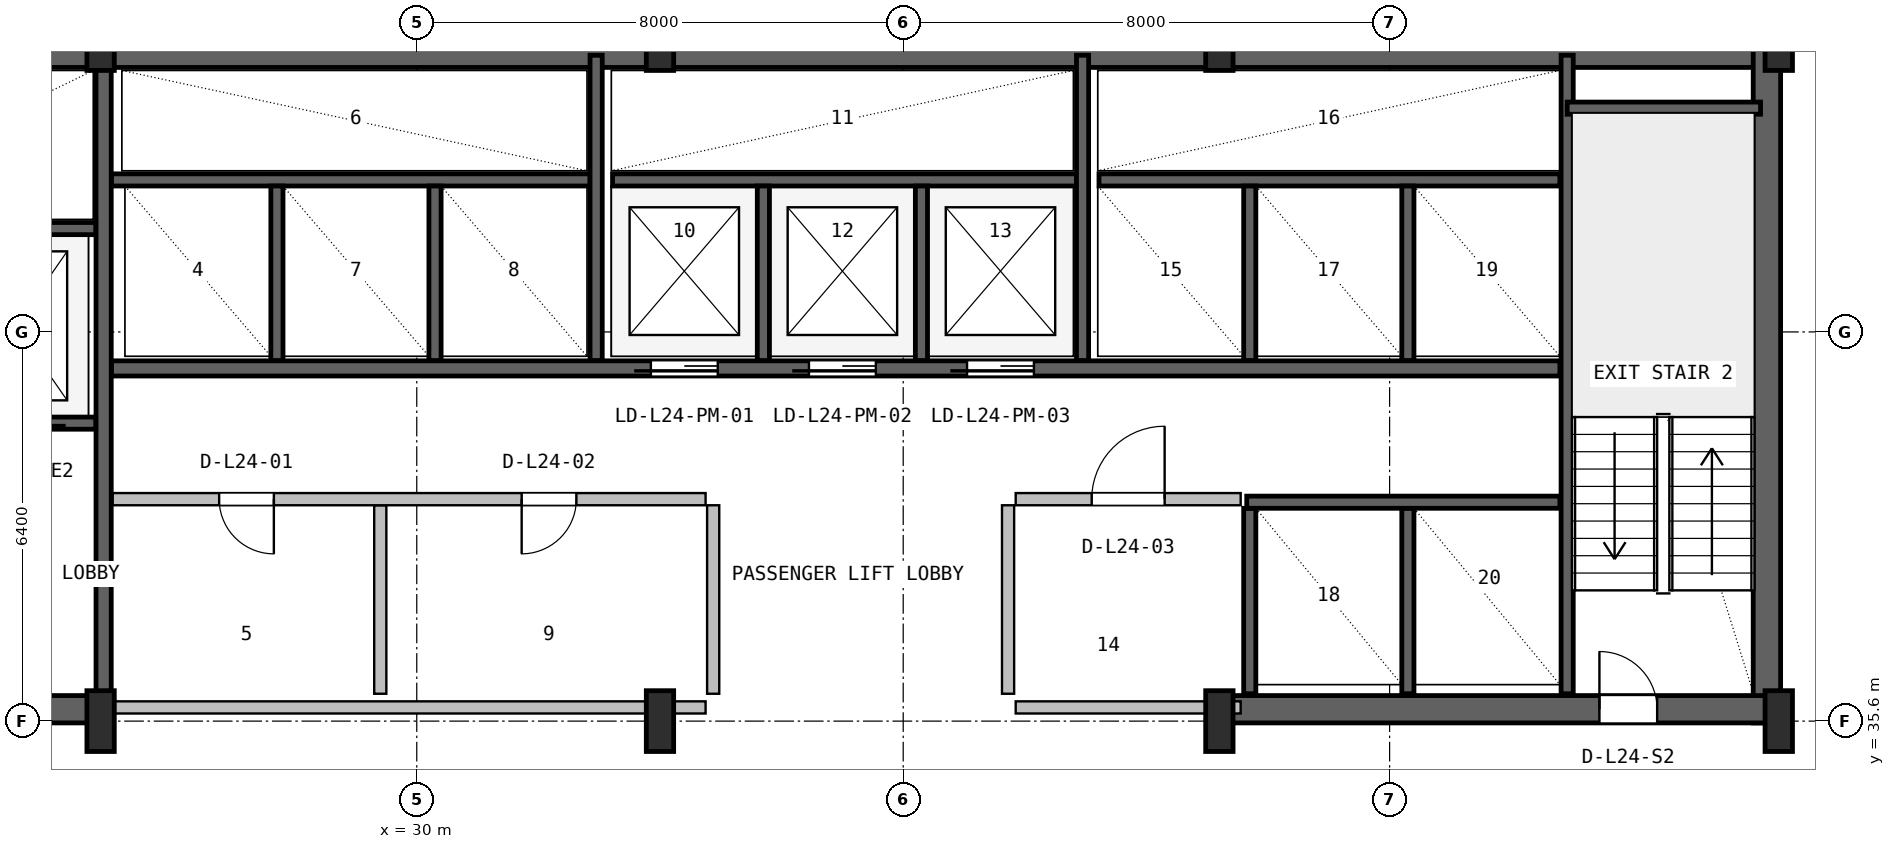
"""IFC4 building model, lengths in metres.
Left out: names, types, materials, properties, quantities, classifications, styles, units other than length and angle.
Written with IfcOpenShell. Run it as: python <this file> out.ifc"""

import sys

from ifc_helpers import new_model, si_unit, direction, frame, frame_2d, origin, origin_2d, place, context, subcontext, project, spatial, rectangle, i_section, extrude, source, transform, mapped, element, fill, save


model = new_model("IFC4")
c1 = context("Model", 3, precision=1e-05, world=origin(), true_north=direction((0.0, 1.0)))
c2 = subcontext(c1, "Body", "Model", "MODEL_VIEW")
j1 = project(units=[si_unit("LENGTHUNIT", "METRE"), si_unit("PLANEANGLEUNIT", "RADIAN")], contexts=[c1])
p1 = place(None, origin())
s1 = spatial("IfcSite", under=j1, at=p1, CompositionType="ELEMENT")
p2 = place(p1, origin())
s2 = spatial("IfcBuilding", under=s1, at=p2, CompositionType="ELEMENT")
p3 = place(p2, frame((0.0, 0.0, 103.0)))
s3 = spatial("IfcBuildingStorey", under=s2, at=p3, CompositionType="ELEMENT", Elevation=103.0)
p4 = place(p3, frame((15.6, 46.575, 0.0), z_axis=(0.0, 0.0, 1.0), x_axis=(1.0, 0.0, 0.0)))
e1 = element("IfcWall", 1, at=p4, inside=s3, PredefinedType="SHEAR", context=c2, shape_type="SweptSolid", body=[
    extrude(rectangle(XDim=36.8, YDim=0.45, at=frame_2d((18.4, 0.0))), origin(), (0.0, 0.0, 1.0), 3.55),
])
p5 = place(p3, frame((52.205, 35.57, 0.0), z_axis=(0.0, 0.0, 1.0), x_axis=(0.0, 1.0, 0.0)))
e2 = element("IfcWall", 2, at=p5, inside=s3, PredefinedType="SHEAR", context=c2, shape_type="SweptSolid", body=[
    extrude(rectangle(XDim=11.23, YDim=0.45, at=frame_2d((5.615, 0.0))), origin(), (0.0, 0.0, 1.0), 3.55),
])
p6 = place(p3, frame((15.57, 35.795, 0.0), z_axis=(0.0, 0.0, 1.0), x_axis=(1.0, 0.0, 0.0)))
e3 = element("IfcWall", 3, at=p6, inside=s3, PredefinedType="SHEAR", context=c2, shape_type="SweptSolid", body=[
    extrude(rectangle(XDim=9.23, YDim=0.45, at=frame_2d((4.615, 0.0))), origin(), (0.0, 0.0, 1.0), 3.55),
])
p7 = place(p6, frame((5.4, 0.0, 0.0)))
e4 = element("IfcOpeningElement", 4, at=p7, cuts=e3, PredefinedType="OPENING", context=c2, shape_type="SweptSolid", body=[
    extrude(rectangle(XDim=1.0, YDim=2.1, at=frame_2d((0.5, 1.05))), frame((0.0, 0.235, 0.0), z_axis=(0.0, -1.0, 0.0), x_axis=(1.0, 0.0, 0.0)), (0.0, 0.0, 1.0), 0.47),
])
p8 = place(p3, frame((43.2, 35.795, 0.0), z_axis=(0.0, 0.0, 1.0), x_axis=(1.0, 0.0, 0.0)))
e5 = element("IfcWall", 5, at=p8, inside=s3, PredefinedType="SHEAR", context=c2, shape_type="SweptSolid", body=[
    extrude(rectangle(XDim=9.23, YDim=0.45, at=frame_2d((4.615, 0.0))), origin(), (0.0, 0.0, 1.0), 3.55),
])
p9 = place(p8, frame((6.25, 0.0, 0.0)))
e6 = element("IfcOpeningElement", 6, at=p9, cuts=e5, PredefinedType="OPENING", context=c2, shape_type="SweptSolid", body=[
    extrude(rectangle(XDim=0.95, YDim=2.1, at=frame_2d((0.475, 1.05))), frame((0.0, 0.235, 0.0), z_axis=(0.0, -1.0, 0.0), x_axis=(1.0, 0.0, 0.0)), (0.0, 0.0, 1.0), 0.47),
])
m1 = source(origin(), c2, "Body", "SweptSolid", [
    extrude(i_section(OverallWidth=0.45, OverallDepth=1.0, WebThickness=0.016, FlangeThickness=0.03, FilletRadius=0.016, at=origin_2d()), origin(), (0.0, 0.0, 1.0), 3.8),
])
for number, where, z_axis, x_axis in (
    (7, (24.8, 35.6, 0.0), (0.0, 0.0, 1.0), (1.0, 0.0, 0.0)),
    (8, (24.8, 46.8, 0.0), (0.0, 0.0, 1.0), (1.0, 0.0, 0.0)),
    (9, (34.0, 35.6, 0.0), (0.0, 0.0, 1.0), (1.0, 0.0, 0.0)),
    (10, (34.0, 46.8, 0.0), (0.0, 0.0, 1.0), (1.0, 0.0, 0.0)),
    (11, (43.2, 35.6, 0.0), (0.0, 0.0, 1.0), (1.0, 0.0, 0.0)),
    (12, (43.2, 46.8, 0.0), (0.0, 0.0, 1.0), (1.0, 0.0, 0.0)),
    (13, (52.4, 35.6, 0.0), (0.0, 0.0, 1.0), (1.0, 0.0, 0.0)),
    (14, (52.4, 46.8, 0.0), (0.0, 0.0, 1.0), (1.0, 0.0, 0.0)),
):
    element("IfcColumn", number, at=place(p3, frame(where, z_axis=z_axis, x_axis=x_axis)), inside=s3, PredefinedType="COLUMN", context=c2, shape_type="MappedRepresentation", body=[
        mapped(m1, transform((0.0, 0.0, 0.0), x_axis=(1.0, 0.0, 0.0), y_axis=(0.0, 1.0, 0.0), z_axis=(0.0, 0.0, 1.0), scale=1.0)),
    ])
p10 = place(p3, frame((24.85, 36.05, 0.0), z_axis=(0.0, 0.0, 1.0), x_axis=(0.0, 1.0, 0.0)))
e15 = element("IfcWall", 15, at=p10, inside=s3, PredefinedType="SHEAR", context=c2, shape_type="SweptSolid", body=[
    extrude(rectangle(XDim=10.45, YDim=0.25, at=frame_2d((5.225, 0.0))), origin(), (0.0, 0.0, 1.0), 3.55),
])
p11 = place(p3, frame((19.2, 40.5, 0.0), z_axis=(0.0, 0.0, 1.0), x_axis=(1.0, 0.0, 0.0)))
e16 = element("IfcWall", 16, at=p11, inside=s3, PredefinedType="SHEAR", context=c2, shape_type="SweptSolid", body=[
    extrude(rectangle(XDim=5.52, YDim=0.2, at=frame_2d((2.76, 0.0))), origin(), (0.0, 0.0, 1.0), 3.55),
])
p12 = place(p11, frame((1.05, 0.0, 0.0)))
e17 = element("IfcOpeningElement", 17, at=p12, cuts=e16, PredefinedType="OPENING", context=c2, shape_type="SweptSolid", body=[
    extrude(rectangle(XDim=1.1, YDim=2.18, at=frame_2d((0.55, 1.09))), frame((0.0, 0.11, 0.0), z_axis=(0.0, -1.0, 0.0), x_axis=(1.0, 0.0, 0.0)), (0.0, 0.0, 1.0), 0.22),
])
p13 = place(p11, frame((3.65, 0.0, 0.0)))
e18 = element("IfcOpeningElement", 18, at=p13, cuts=e16, PredefinedType="OPENING", context=c2, shape_type="SweptSolid", body=[
    extrude(rectangle(XDim=1.1, YDim=2.18, at=frame_2d((0.55, 1.09))), frame((0.0, 0.11, 0.0), z_axis=(0.0, -1.0, 0.0), x_axis=(1.0, 0.0, 0.0)), (0.0, 0.0, 1.0), 0.22),
])
p14 = place(p3, frame((19.2, 43.7, 0.0), z_axis=(0.0, 0.0, 1.0), x_axis=(1.0, 0.0, 0.0)))
e19 = element("IfcWall", 19, at=p14, inside=s3, PredefinedType="SHEAR", context=c2, shape_type="SweptSolid", body=[
    extrude(rectangle(XDim=5.52, YDim=0.2, at=frame_2d((2.76, 0.0))), origin(), (0.0, 0.0, 1.0), 3.55),
])
p15 = place(p3, frame((48.92, 36.05, 0.0), z_axis=(0.0, 0.0, 1.0), x_axis=(0.0, 1.0, 0.0)))
e20 = element("IfcWall", 20, at=p15, inside=s3, PredefinedType="SHEAR", context=c2, shape_type="SweptSolid", body=[
    extrude(rectangle(XDim=10.5, YDim=0.2, at=frame_2d((5.25, 0.0))), origin(), (0.0, 0.0, 1.0), 3.55),
])
p16 = place(p3, frame((48.92, 45.68, 0.0), z_axis=(0.0, 0.0, 1.0), x_axis=(1.0, 0.0, 0.0)))
e21 = element("IfcWall", 21, at=p16, inside=s3, PredefinedType="SHEAR", context=c2, shape_type="SweptSolid", body=[
    extrude(rectangle(XDim=3.18, YDim=0.2, at=frame_2d((1.59, 0.0))), origin(), (0.0, 0.0, 1.0), 3.55),
])
p17 = place(p3, frame((24.98, 41.4, 0.0), z_axis=(0.0, 0.0, 1.0), x_axis=(1.0, 0.0, 0.0)))
e22 = element("IfcWall", 22, at=p17, inside=s3, PredefinedType="SHEAR", context=c2, shape_type="SweptSolid", body=[
    extrude(rectangle(XDim=23.82, YDim=0.25, at=frame_2d((11.91, 0.0))), origin(), (0.0, 0.0, 1.0), 3.55),
])
p18 = place(p17, frame((8.87, 0.0, 0.0)))
e23 = element("IfcOpeningElement", 23, at=p18, cuts=e22, PredefinedType="OPENING", context=c2, shape_type="SweptSolid", body=[
    extrude(rectangle(XDim=1.1, YDim=2.18, at=frame_2d((0.55, 1.09))), frame((0.0, 0.135, 0.0), z_axis=(0.0, -1.0, 0.0), x_axis=(1.0, 0.0, 0.0)), (0.0, 0.0, 1.0), 0.27),
])
p19 = place(p17, frame((11.47, 0.0, 0.0)))
e24 = element("IfcOpeningElement", 24, at=p19, cuts=e22, PredefinedType="OPENING", context=c2, shape_type="SweptSolid", body=[
    extrude(rectangle(XDim=1.1, YDim=2.18, at=frame_2d((0.55, 1.09))), frame((0.0, 0.135, 0.0), z_axis=(0.0, -1.0, 0.0), x_axis=(1.0, 0.0, 0.0)), (0.0, 0.0, 1.0), 0.27),
])
p20 = place(p17, frame((14.07, 0.0, 0.0)))
e25 = element("IfcOpeningElement", 25, at=p20, cuts=e22, PredefinedType="OPENING", context=c2, shape_type="SweptSolid", body=[
    extrude(rectangle(XDim=1.1, YDim=2.18, at=frame_2d((0.55, 1.09))), frame((0.0, 0.135, 0.0), z_axis=(0.0, -1.0, 0.0), x_axis=(1.0, 0.0, 0.0)), (0.0, 0.0, 1.0), 0.27),
])
p21 = place(p3, frame((24.98, 44.5, 0.0), z_axis=(0.0, 0.0, 1.0), x_axis=(1.0, 0.0, 0.0)))
e26 = element("IfcWall", 26, at=p21, inside=s3, PredefinedType="SHEAR", context=c2, shape_type="SweptSolid", body=[
    extrude(rectangle(XDim=7.87, YDim=0.2, at=frame_2d((3.935, 0.0))), origin(), (0.0, 0.0, 1.0), 3.55),
])
for number, where, z_axis, x_axis in (
    (27, (27.7, 41.53, 0.0), (0.0, 0.0, 1.0), (0.0, 1.0, 0.0)),
    (28, (30.3, 41.53, 0.0), (0.0, 0.0, 1.0), (0.0, 1.0, 0.0)),
):
    element("IfcWall", number, at=place(p3, frame(where, z_axis=z_axis, x_axis=x_axis)), inside=s3, PredefinedType="SHEAR", context=c2, shape_type="SweptSolid", body=[
        extrude(rectangle(XDim=2.87, YDim=0.2, at=frame_2d((1.435, 0.0))), origin(), (0.0, 0.0, 1.0), 3.55),
    ])
p22 = place(p3, frame((32.95, 41.53, 0.0), z_axis=(0.0, 0.0, 1.0), x_axis=(0.0, 1.0, 0.0)))
e29 = element("IfcWall", 29, at=p22, inside=s3, PredefinedType="SHEAR", context=c2, shape_type="SweptSolid", body=[
    extrude(rectangle(XDim=5.02, YDim=0.2, at=frame_2d((2.51, 0.0))), origin(), (0.0, 0.0, 1.0), 3.55),
])
p23 = place(p3, frame((33.22, 44.5, 0.0), z_axis=(0.0, 0.0, 1.0), x_axis=(1.0, 0.0, 0.0)))
e30 = element("IfcWall", 30, at=p23, inside=s3, PredefinedType="SHEAR", context=c2, shape_type="SweptSolid", body=[
    extrude(rectangle(XDim=7.63, YDim=0.2, at=frame_2d((3.815, 0.0))), origin(), (0.0, 0.0, 1.0), 3.55),
])
for number, where, z_axis, x_axis in (
    (31, (35.7, 41.53, 0.0), (0.0, 0.0, 1.0), (0.0, 1.0, 0.0)),
    (32, (38.3, 41.53, 0.0), (0.0, 0.0, 1.0), (0.0, 1.0, 0.0)),
):
    element("IfcWall", number, at=place(p3, frame(where, z_axis=z_axis, x_axis=x_axis)), inside=s3, PredefinedType="SHEAR", context=c2, shape_type="SweptSolid", body=[
        extrude(rectangle(XDim=2.87, YDim=0.2, at=frame_2d((1.435, 0.0))), origin(), (0.0, 0.0, 1.0), 3.55),
    ])
p24 = place(p3, frame((40.95, 41.53, 0.0), z_axis=(0.0, 0.0, 1.0), x_axis=(0.0, 1.0, 0.0)))
e33 = element("IfcWall", 33, at=p24, inside=s3, PredefinedType="SHEAR", context=c2, shape_type="SweptSolid", body=[
    extrude(rectangle(XDim=5.02, YDim=0.2, at=frame_2d((2.51, 0.0))), origin(), (0.0, 0.0, 1.0), 3.55),
])
p25 = place(p3, frame((41.22, 44.5, 0.0), z_axis=(0.0, 0.0, 1.0), x_axis=(1.0, 0.0, 0.0)))
e34 = element("IfcWall", 34, at=p25, inside=s3, PredefinedType="SHEAR", context=c2, shape_type="SweptSolid", body=[
    extrude(rectangle(XDim=7.58, YDim=0.2, at=frame_2d((3.79, 0.0))), origin(), (0.0, 0.0, 1.0), 3.55),
])
for number, where, z_axis, x_axis in (
    (35, (43.7, 41.53, 0.0), (0.0, 0.0, 1.0), (0.0, 1.0, 0.0)),
    (36, (46.3, 41.53, 0.0), (0.0, 0.0, 1.0), (0.0, 1.0, 0.0)),
):
    element("IfcWall", number, at=place(p3, frame(where, z_axis=z_axis, x_axis=x_axis)), inside=s3, PredefinedType="SHEAR", context=c2, shape_type="SweptSolid", body=[
        extrude(rectangle(XDim=2.87, YDim=0.2, at=frame_2d((1.435, 0.0))), origin(), (0.0, 0.0, 1.0), 3.55),
    ])
for number, where, z_axis, x_axis in (
    (37, (43.7, 36.05, 0.0), (0.0, 0.0, 1.0), (0.0, 1.0, 0.0)),
    (38, (46.3, 36.05, 0.0), (0.0, 0.0, 1.0), (0.0, 1.0, 0.0)),
):
    element("IfcWall", number, at=place(p3, frame(where, z_axis=z_axis, x_axis=x_axis)), inside=s3, PredefinedType="SHEAR", context=c2, shape_type="SweptSolid", body=[
        extrude(rectangle(XDim=3.05, YDim=0.2, at=frame_2d((1.525, 0.0))), origin(), (0.0, 0.0, 1.0), 3.55),
    ])
p26 = place(p3, frame((43.65, 39.2, 0.0), z_axis=(0.0, 0.0, 1.0), x_axis=(1.0, 0.0, 0.0)))
e39 = element("IfcWall", 39, at=p26, inside=s3, PredefinedType="SHEAR", context=c2, shape_type="SweptSolid", body=[
    extrude(rectangle(XDim=5.15, YDim=0.2, at=frame_2d((2.575, 0.0))), origin(), (0.0, 0.0, 1.0), 3.55),
])
p27 = place(p3, frame((25.0, 35.825, 0.0), z_axis=(0.0, 0.0, 1.0), x_axis=(1.0, 0.0, 0.0)))
e40 = element("IfcWall", 40, at=p27, inside=s3, PredefinedType="PLUMBINGWALL", context=c2, shape_type="SweptSolid", body=[
    extrude(rectangle(XDim=9.75, YDim=0.2, at=frame_2d((4.875, 0.0))), origin(), (0.0, 0.0, 1.0), 2.325),
])
p28 = place(p3, frame((29.4, 36.05, 0.0), z_axis=(0.0, 0.0, 1.0), x_axis=(0.0, 1.0, 0.0)))
e41 = element("IfcWall", 41, at=p28, inside=s3, PredefinedType="PLUMBINGWALL", context=c2, shape_type="SweptSolid", body=[
    extrude(rectangle(XDim=3.1, YDim=0.2, at=frame_2d((1.55, 0.0))), origin(), (0.0, 0.0, 1.0), 3.53),
])
p29 = place(p3, frame((25.0, 39.25, 0.0), z_axis=(0.0, 0.0, 1.0), x_axis=(1.0, 0.0, 0.0)))
e42 = element("IfcWall", 42, at=p29, inside=s3, PredefinedType="PLUMBINGWALL", context=c2, shape_type="SweptSolid", body=[
    extrude(rectangle(XDim=9.75, YDim=0.2, at=frame_2d((4.875, 0.0))), origin(), (0.0, 0.0, 1.0), 3.53),
])
p30 = place(p29, frame((1.75, 0.0, 0.0)))
e43 = element("IfcOpeningElement", 43, at=p30, cuts=e42, PredefinedType="OPENING", context=c2, shape_type="SweptSolid", body=[
    extrude(rectangle(XDim=0.9, YDim=2.06, at=frame_2d((0.45, 1.03))), frame((0.0, 0.11, 0.0), z_axis=(0.0, -1.0, 0.0), x_axis=(1.0, 0.0, 0.0)), (0.0, 0.0, 1.0), 0.22),
])
p31 = place(p29, frame((6.725, 0.0, 0.0)))
e44 = element("IfcOpeningElement", 44, at=p31, cuts=e42, PredefinedType="OPENING", context=c2, shape_type="SweptSolid", body=[
    extrude(rectangle(XDim=0.9, YDim=2.06, at=frame_2d((0.45, 1.03))), frame((0.0, 0.11, 0.0), z_axis=(0.0, -1.0, 0.0), x_axis=(1.0, 0.0, 0.0)), (0.0, 0.0, 1.0), 0.22),
])
p32 = place(p3, frame((34.875, 36.05, 0.0), z_axis=(0.0, 0.0, 1.0), x_axis=(0.0, 1.0, 0.0)))
e45 = element("IfcWall", 45, at=p32, inside=s3, PredefinedType="PLUMBINGWALL", context=c2, shape_type="SweptSolid", body=[
    extrude(rectangle(XDim=3.1, YDim=0.2, at=frame_2d((1.55, 0.0))), origin(), (0.0, 0.0, 1.0), 3.53),
])
p33 = place(p3, frame((39.85, 35.825, 0.0), z_axis=(0.0, 0.0, 1.0), x_axis=(1.0, 0.0, 0.0)))
e46 = element("IfcWall", 46, at=p33, inside=s3, PredefinedType="SOLIDWALL", context=c2, shape_type="SweptSolid", body=[
    extrude(rectangle(XDim=3.7, YDim=0.2, at=frame_2d((1.85, 0.0))), origin(), (0.0, 0.0, 1.0), 2.325),
])
p34 = place(p3, frame((39.85, 39.25, 0.0), z_axis=(0.0, 0.0, 1.0), x_axis=(1.0, 0.0, 0.0)))
e47 = element("IfcWall", 47, at=p34, inside=s3, PredefinedType="SOLIDWALL", context=c2, shape_type="SweptSolid", body=[
    extrude(rectangle(XDim=3.7, YDim=0.2, at=frame_2d((1.85, 0.0))), origin(), (0.0, 0.0, 1.0), 3.53),
])
p35 = place(p34, frame((1.25, 0.0, 0.0)))
e48 = element("IfcOpeningElement", 48, at=p35, cuts=e47, PredefinedType="OPENING", context=c2, shape_type="SweptSolid", body=[
    extrude(rectangle(XDim=1.2, YDim=2.1, at=frame_2d((0.6, 1.05))), frame((0.0, 0.11, 0.0), z_axis=(0.0, -1.0, 0.0), x_axis=(1.0, 0.0, 0.0)), (0.0, 0.0, 1.0), 0.22),
])
p36 = place(p3, frame((39.725, 36.05, 0.0), z_axis=(0.0, 0.0, 1.0), x_axis=(0.0, 1.0, 0.0)))
e49 = element("IfcWall", 49, at=p36, inside=s3, PredefinedType="SOLIDWALL", context=c2, shape_type="SweptSolid", body=[
    extrude(rectangle(XDim=3.1, YDim=0.2, at=frame_2d((1.55, 0.0))), origin(), (0.0, 0.0, 1.0), 3.53),
])
m2 = source(origin(), c2, "Body", "SweptSolid", [
    extrude(rectangle(XDim=0.95, YDim=2.1, at=frame_2d((0.475, 1.05))), frame((0.0, 0.025, 0.0), z_axis=(0.0, -1.0, 0.0), x_axis=(1.0, 0.0, 0.0)), (0.0, 0.0, 1.0), 0.05),
])
p37 = place(p9, origin())
e50 = element("IfcDoor", 50, at=p37, inside=s3, OperationType="SINGLE_SWING_LEFT", PredefinedType="DOOR", context=c2, shape_type="MappedRepresentation", body=[
    mapped(m2, transform((0.0, 0.0, 0.0), x_axis=(1.0, 0.0, 0.0), y_axis=(0.0, 1.0, 0.0), z_axis=(0.0, 0.0, 1.0), scale=1.0)),
])
fill(e6, e50)
m3 = source(origin(), c2, "Body", "SweptSolid", [
    extrude(rectangle(XDim=1.1, YDim=2.18, at=frame_2d((0.55, 1.09))), frame((0.0, 0.025, 0.0), z_axis=(0.0, -1.0, 0.0), x_axis=(1.0, 0.0, 0.0)), (0.0, 0.0, 1.0), 0.05),
])
p38 = place(p18, frame((1.1, 0.0, 0.0), z_axis=(0.0, 0.0, 1.0), x_axis=(-1.0, 0.0, 0.0)))
e51 = element("IfcDoor", 51, at=p38, inside=s3, OperationType="SLIDING_TO_LEFT", PredefinedType="DOOR", context=c2, shape_type="MappedRepresentation", body=[
    mapped(m3, transform((0.0, 0.0, 0.0), x_axis=(1.0, 0.0, 0.0), y_axis=(0.0, 1.0, 0.0), z_axis=(0.0, 0.0, 1.0), scale=1.0)),
])
fill(e23, e51)
p39 = place(p19, frame((1.1, 0.0, 0.0), z_axis=(0.0, 0.0, 1.0), x_axis=(-1.0, 0.0, 0.0)))
e52 = element("IfcDoor", 52, at=p39, inside=s3, OperationType="SLIDING_TO_LEFT", PredefinedType="DOOR", context=c2, shape_type="MappedRepresentation", body=[
    mapped(m3, transform((0.0, 0.0, 0.0), x_axis=(1.0, 0.0, 0.0), y_axis=(0.0, 1.0, 0.0), z_axis=(0.0, 0.0, 1.0), scale=1.0)),
])
fill(e24, e52)
p40 = place(p20, frame((1.1, 0.0, 0.0), z_axis=(0.0, 0.0, 1.0), x_axis=(-1.0, 0.0, 0.0)))
e53 = element("IfcDoor", 53, at=p40, inside=s3, OperationType="SLIDING_TO_LEFT", PredefinedType="DOOR", context=c2, shape_type="MappedRepresentation", body=[
    mapped(m3, transform((0.0, 0.0, 0.0), x_axis=(1.0, 0.0, 0.0), y_axis=(0.0, 1.0, 0.0), z_axis=(0.0, 0.0, 1.0), scale=1.0)),
])
fill(e25, e53)
m4 = source(origin(), c2, "Body", "SweptSolid", [
    extrude(rectangle(XDim=0.9, YDim=2.06, at=frame_2d((0.45, 1.03))), frame((0.0, 0.025, 0.0), z_axis=(0.0, -1.0, 0.0), x_axis=(1.0, 0.0, 0.0)), (0.0, 0.0, 1.0), 0.05),
])
p41 = place(p30, frame((0.9, 0.0, 0.0), z_axis=(0.0, 0.0, 1.0), x_axis=(-1.0, 0.0, 0.0)))
e54 = element("IfcDoor", 54, at=p41, inside=s3, OperationType="SINGLE_SWING_RIGHT", PredefinedType="DOOR", context=c2, shape_type="MappedRepresentation", body=[
    mapped(m4, transform((0.0, 0.0, 0.0), x_axis=(1.0, 0.0, 0.0), y_axis=(0.0, 1.0, 0.0), z_axis=(0.0, 0.0, 1.0), scale=1.0)),
])
fill(e43, e54)
p42 = place(p31, frame((0.9, 0.0, 0.0), z_axis=(0.0, 0.0, 1.0), x_axis=(-1.0, 0.0, 0.0)))
e55 = element("IfcDoor", 55, at=p42, inside=s3, OperationType="SINGLE_SWING_LEFT", PredefinedType="DOOR", context=c2, shape_type="MappedRepresentation", body=[
    mapped(m4, transform((0.0, 0.0, 0.0), x_axis=(1.0, 0.0, 0.0), y_axis=(0.0, 1.0, 0.0), z_axis=(0.0, 0.0, 1.0), scale=1.0)),
])
fill(e44, e55)
m5 = source(origin(), c2, "Body", "SweptSolid", [
    extrude(rectangle(XDim=1.2, YDim=2.1, at=frame_2d((0.6, 1.05))), frame((0.0, 0.025, 0.0), z_axis=(0.0, -1.0, 0.0), x_axis=(1.0, 0.0, 0.0)), (0.0, 0.0, 1.0), 0.05),
])
p43 = place(p35, origin())
e56 = element("IfcDoor", 56, at=p43, inside=s3, OperationType="SINGLE_SWING_RIGHT", PredefinedType="DOOR", context=c2, shape_type="MappedRepresentation", body=[
    mapped(m5, transform((0.0, 0.0, 0.0), x_axis=(1.0, 0.0, 0.0), y_axis=(0.0, 1.0, 0.0), z_axis=(0.0, 0.0, 1.0), scale=1.0)),
])
fill(e48, e56)
save(model, sys.argv[1])
